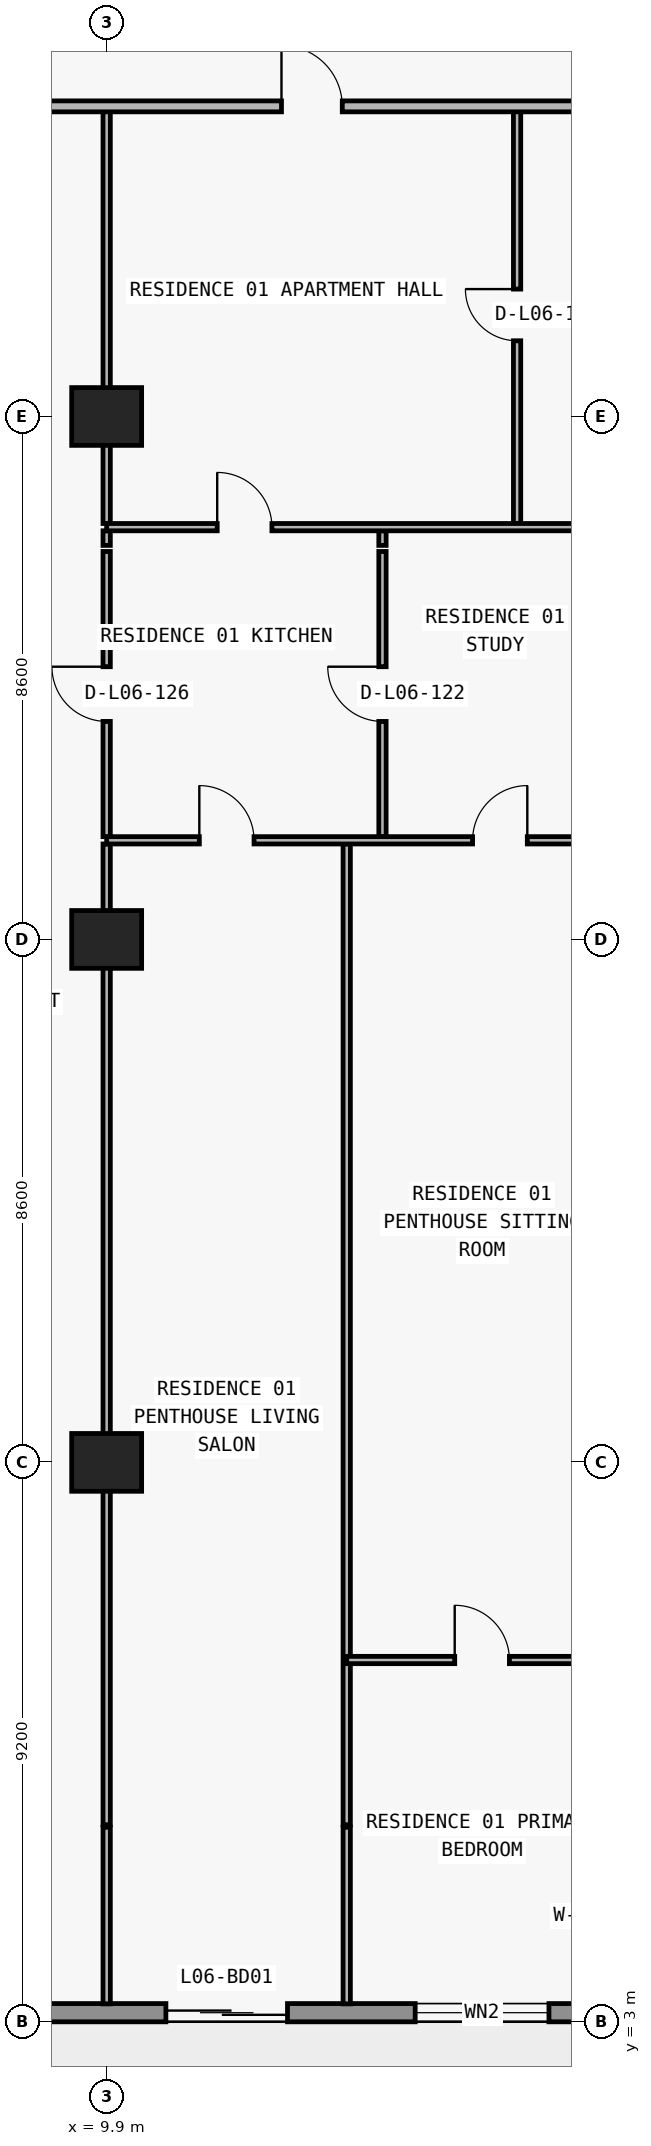
"""IFC4 building model, lengths in metres.
Left out: names, types, materials, properties, quantities, classifications, styles, units other than length and angle.
Written with IfcOpenShell. Run it as: python <this file> out.ifc"""

import sys

from ifc_helpers import new_model, si_unit, direction, frame, frame_2d, origin, origin_2d, place, context, subcontext, project, spatial, rectangle, extrude, element, fill, save


model = new_model("IFC4")
c1 = context("Model", 3, precision=1e-05, world=origin(), true_north=direction((0.0, 1.0)))
c2 = subcontext(c1, "Body", "Model", "MODEL_VIEW")
j1 = project(units=[si_unit("LENGTHUNIT", "METRE"), si_unit("PLANEANGLEUNIT", "RADIAN")], contexts=[c1])
p1 = place(None, origin())
s1 = spatial("IfcSite", under=j1, at=p1, CompositionType="ELEMENT")
p2 = place(p1, origin())
s2 = spatial("IfcBuilding", under=s1, at=p2, CompositionType="ELEMENT")
p3 = place(p2, frame((0.0, 0.0, 30.0)))
s3 = spatial("IfcBuildingStorey", under=s2, at=p3, CompositionType="ELEMENT", Elevation=30.0)
for number, where, z_axis, x_axis in (
    (1, (9.9, 12.2, 0.0), (0.0, 0.0, 1.0), (1.0, 0.0, 0.0)),
    (2, (9.9, 20.8, 0.0), (0.0, 0.0, 1.0), (1.0, 0.0, 0.0)),
    (3, (9.9, 29.4, 0.0), (0.0, 0.0, 1.0), (1.0, 0.0, 0.0)),
):
    element("IfcColumn", number, at=place(p3, frame(where, z_axis=z_axis, x_axis=x_axis)), inside=s3, PredefinedType="COLUMN", context=c2, shape_type="SweptSolid", body=[
        extrude(rectangle(XDim=1.15, YDim=0.95, at=origin_2d()), origin(), (0.0, 0.0, 1.0), 3.05),
    ])
p4 = place(p3, frame((72.7, 3.15, 0.0), z_axis=(0.0, 0.0, 1.0), x_axis=(-1.0, 0.0, 0.0)))
e4 = element("IfcWall", 4, at=p4, inside=s3, PredefinedType="STANDARD", context=c2, shape_type="SweptSolid", body=[
    extrude(rectangle(XDim=67.6, YDim=0.3, at=frame_2d((33.8, 0.0))), origin(), (0.0, 0.0, 1.0), 3.05),
])
p5 = place(p4, frame((59.826, 0.0, 0.0)))
e5 = element("IfcOpeningElement", 5, at=p5, cuts=e4, PredefinedType="OPENING", context=c2, shape_type="SweptSolid", body=[
    extrude(rectangle(XDim=2.0, YDim=2.3, at=frame_2d((1.0, 1.15))), frame((0.0, 0.16, 0.0), z_axis=(0.0, -1.0, 0.0), x_axis=(1.0, 0.0, 0.0)), (0.0, 0.0, 1.0), 0.32),
])
p6 = place(p4, frame((55.526, 0.0, 0.85)))
e6 = element("IfcOpeningElement", 6, at=p6, cuts=e4, PredefinedType="OPENING", context=c2, shape_type="SweptSolid", body=[
    extrude(rectangle(XDim=2.2, YDim=1.55, at=frame_2d((1.1, 0.775))), frame((0.0, 0.16, 0.0), z_axis=(0.0, -1.0, 0.0), x_axis=(1.0, 0.0, 0.0)), (0.0, 0.0, 1.0), 0.32),
])
p7 = place(p4, frame((51.09, 0.0, 0.0)))
e7 = element("IfcOpeningElement", 7, at=p7, cuts=e4, PredefinedType="OPENING", context=c2, shape_type="SweptSolid", body=[
    extrude(rectangle(XDim=2.0, YDim=2.3, at=frame_2d((1.0, 1.15))), frame((0.0, 0.16, 0.0), z_axis=(0.0, -1.0, 0.0), x_axis=(1.0, 0.0, 0.0)), (0.0, 0.0, 1.0), 0.32),
])
p8 = place(p4, frame((46.99, 0.0, 0.85)))
e8 = element("IfcOpeningElement", 8, at=p8, cuts=e4, PredefinedType="OPENING", context=c2, shape_type="SweptSolid", body=[
    extrude(rectangle(XDim=1.8, YDim=1.55, at=frame_2d((0.9, 0.775))), frame((0.0, 0.16, 0.0), z_axis=(0.0, -1.0, 0.0), x_axis=(1.0, 0.0, 0.0)), (0.0, 0.0, 1.0), 0.32),
])
p9 = place(p4, frame((43.026, 0.0, 0.0)))
e9 = element("IfcOpeningElement", 9, at=p9, cuts=e4, PredefinedType="OPENING", context=c2, shape_type="SweptSolid", body=[
    extrude(rectangle(XDim=2.0, YDim=2.3, at=frame_2d((1.0, 1.15))), frame((0.0, 0.16, 0.0), z_axis=(0.0, -1.0, 0.0), x_axis=(1.0, 0.0, 0.0)), (0.0, 0.0, 1.0), 0.32),
])
p10 = place(p4, frame((38.726, 0.0, 0.85)))
e10 = element("IfcOpeningElement", 10, at=p10, cuts=e4, PredefinedType="OPENING", context=c2, shape_type="SweptSolid", body=[
    extrude(rectangle(XDim=2.2, YDim=1.55, at=frame_2d((1.1, 0.775))), frame((0.0, 0.16, 0.0), z_axis=(0.0, -1.0, 0.0), x_axis=(1.0, 0.0, 0.0)), (0.0, 0.0, 1.0), 0.32),
])
p11 = place(p4, frame((34.69, 0.0, 0.0)))
e11 = element("IfcOpeningElement", 11, at=p11, cuts=e4, PredefinedType="OPENING", context=c2, shape_type="SweptSolid", body=[
    extrude(rectangle(XDim=2.0, YDim=2.3, at=frame_2d((1.0, 1.15))), frame((0.0, 0.16, 0.0), z_axis=(0.0, -1.0, 0.0), x_axis=(1.0, 0.0, 0.0)), (0.0, 0.0, 1.0), 0.32),
])
p12 = place(p4, frame((30.81, 0.0, 0.65)))
e12 = element("IfcOpeningElement", 12, at=p12, cuts=e4, PredefinedType="OPENING", context=c2, shape_type="SweptSolid", body=[
    extrude(rectangle(XDim=2.6, YDim=1.85, at=frame_2d((1.3, 0.925))), frame((0.0, 0.16, 0.0), z_axis=(0.0, -1.0, 0.0), x_axis=(1.0, 0.0, 0.0)), (0.0, 0.0, 1.0), 0.32),
])
p13 = place(p4, frame((24.7, 0.0, 0.85)))
e13 = element("IfcOpeningElement", 13, at=p13, cuts=e4, PredefinedType="OPENING", context=c2, shape_type="SweptSolid", body=[
    extrude(rectangle(XDim=2.2, YDim=1.55, at=frame_2d((1.1, 0.775))), frame((0.0, 0.16, 0.0), z_axis=(0.0, -1.0, 0.0), x_axis=(1.0, 0.0, 0.0)), (0.0, 0.0, 1.0), 0.32),
])
p14 = place(p4, frame((18.626, 0.0, 0.0)))
e14 = element("IfcOpeningElement", 14, at=p14, cuts=e4, PredefinedType="OPENING", context=c2, shape_type="SweptSolid", body=[
    extrude(rectangle(XDim=2.0, YDim=2.3, at=frame_2d((1.0, 1.15))), frame((0.0, 0.16, 0.0), z_axis=(0.0, -1.0, 0.0), x_axis=(1.0, 0.0, 0.0)), (0.0, 0.0, 1.0), 0.32),
])
p15 = place(p4, frame((14.326, 0.0, 0.85)))
e15 = element("IfcOpeningElement", 15, at=p15, cuts=e4, PredefinedType="OPENING", context=c2, shape_type="SweptSolid", body=[
    extrude(rectangle(XDim=2.2, YDim=1.55, at=frame_2d((1.1, 0.775))), frame((0.0, 0.16, 0.0), z_axis=(0.0, -1.0, 0.0), x_axis=(1.0, 0.0, 0.0)), (0.0, 0.0, 1.0), 0.32),
])
p16 = place(p4, frame((9.89, 0.0, 0.0)))
e16 = element("IfcOpeningElement", 16, at=p16, cuts=e4, PredefinedType="OPENING", context=c2, shape_type="SweptSolid", body=[
    extrude(rectangle(XDim=2.0, YDim=2.3, at=frame_2d((1.0, 1.15))), frame((0.0, 0.16, 0.0), z_axis=(0.0, -1.0, 0.0), x_axis=(1.0, 0.0, 0.0)), (0.0, 0.0, 1.0), 0.32),
])
p17 = place(p4, frame((5.79, 0.0, 0.85)))
e17 = element("IfcOpeningElement", 17, at=p17, cuts=e4, PredefinedType="OPENING", context=c2, shape_type="SweptSolid", body=[
    extrude(rectangle(XDim=1.8, YDim=1.55, at=frame_2d((0.9, 0.775))), frame((0.0, 0.16, 0.0), z_axis=(0.0, -1.0, 0.0), x_axis=(1.0, 0.0, 0.0)), (0.0, 0.0, 1.0), 0.32),
])
p18 = place(p3, frame((9.9, 3.295, 0.0), z_axis=(0.0, 0.0, 1.0), x_axis=(0.0, 1.0, 0.0)))
e18 = element("IfcWall", 18, at=p18, inside=s3, PredefinedType="PARTITIONING", context=c2, shape_type="SweptSolid", body=[
    extrude(rectangle(XDim=2.905, YDim=0.12, at=frame_2d((1.453, 0.0))), origin(), (0.0, 0.0, 1.0), 3.05),
])
p19 = place(p3, frame((9.9, 6.24, 0.0), z_axis=(0.0, 0.0, 1.0), x_axis=(0.0, 1.0, 0.0)))
e19 = element("IfcWall", 19, at=p19, inside=s3, PredefinedType="PARTITIONING", context=c2, shape_type="SweptSolid", body=[
    extrude(rectangle(XDim=16.13, YDim=0.12, at=frame_2d((8.065, 0.0))), origin(), (0.0, 0.0, 1.0), 2.11),
])
p20 = place(p3, frame((9.9, 22.49, 0.0), z_axis=(0.0, 0.0, 1.0), x_axis=(0.0, 1.0, 0.0)))
e20 = element("IfcWall", 20, at=p20, inside=s3, PredefinedType="PARTITIONING", context=c2, shape_type="SweptSolid", body=[
    extrude(rectangle(XDim=4.69, YDim=0.12, at=frame_2d((2.345, 0.0))), origin(), (0.0, 0.0, 1.0), 2.11),
])
p21 = place(p20, frame((1.895, 0.0, 0.0)))
e21 = element("IfcOpeningElement", 21, at=p21, cuts=e20, PredefinedType="OPENING", context=c2, shape_type="SweptSolid", body=[
    extrude(rectangle(XDim=0.9, YDim=2.06, at=frame_2d((0.45, 1.03))), frame((0.0, 0.07, 0.0), z_axis=(0.0, -1.0, 0.0), x_axis=(1.0, 0.0, 0.0)), (0.0, 0.0, 1.0), 0.14),
])
p22 = place(p3, frame((9.9, 27.28, 0.0), z_axis=(0.0, 0.0, 1.0), x_axis=(0.0, 1.0, 0.0)))
e22 = element("IfcWall", 22, at=p22, inside=s3, PredefinedType="PARTITIONING", context=c2, shape_type="SweptSolid", body=[
    extrude(rectangle(XDim=0.24, YDim=0.12, at=frame_2d((0.12, 0.0))), origin(), (0.0, 0.0, 1.0), 2.11),
])
p23 = place(p3, frame((9.9, 27.64, 0.0), z_axis=(0.0, 0.0, 1.0), x_axis=(0.0, 1.0, 0.0)))
e23 = element("IfcWall", 23, at=p23, inside=s3, PredefinedType="PARTITIONING", context=c2, shape_type="SweptSolid", body=[
    extrude(rectangle(XDim=6.86, YDim=0.12, at=frame_2d((3.43, 0.0))), origin(), (0.0, 0.0, 1.0), 2.11),
])
p24 = place(p3, frame((13.848, 3.295, 0.0), z_axis=(0.0, 0.0, 1.0), x_axis=(0.0, 1.0, 0.0)))
e24 = element("IfcWall", 24, at=p24, inside=s3, PredefinedType="PARTITIONING", context=c2, shape_type="SweptSolid", body=[
    extrude(rectangle(XDim=2.905, YDim=0.12, at=frame_2d((1.453, 0.0))), origin(), (0.0, 0.0, 1.0), 3.05),
])
p25 = place(p3, frame((13.848, 6.24, 0.0), z_axis=(0.0, 0.0, 1.0), x_axis=(0.0, 1.0, 0.0)))
e25 = element("IfcWall", 25, at=p25, inside=s3, PredefinedType="PARTITIONING", context=c2, shape_type="SweptSolid", body=[
    extrude(rectangle(XDim=16.13, YDim=0.12, at=frame_2d((8.065, 0.0))), origin(), (0.0, 0.0, 1.0), 3.05),
])
p26 = place(p3, frame((14.436, 22.49, 0.0), z_axis=(0.0, 0.0, 1.0), x_axis=(0.0, 1.0, 0.0)))
e26 = element("IfcWall", 26, at=p26, inside=s3, PredefinedType="PARTITIONING", context=c2, shape_type="SweptSolid", body=[
    extrude(rectangle(XDim=4.69, YDim=0.12, at=frame_2d((2.345, 0.0))), origin(), (0.0, 0.0, 1.0), 3.05),
])
p27 = place(p26, frame((1.895, 0.0, 0.0)))
e27 = element("IfcOpeningElement", 27, at=p27, cuts=e26, PredefinedType="OPENING", context=c2, shape_type="SweptSolid", body=[
    extrude(rectangle(XDim=0.9, YDim=2.15, at=frame_2d((0.45, 1.075))), frame((0.0, 0.07, 0.0), z_axis=(0.0, -1.0, 0.0), x_axis=(1.0, 0.0, 0.0)), (0.0, 0.0, 1.0), 0.14),
])
p28 = place(p3, frame((14.436, 27.28, 0.0), z_axis=(0.0, 0.0, 1.0), x_axis=(0.0, 1.0, 0.0)))
e28 = element("IfcWall", 28, at=p28, inside=s3, PredefinedType="PARTITIONING", context=c2, shape_type="SweptSolid", body=[
    extrude(rectangle(XDim=0.24, YDim=0.12, at=frame_2d((0.12, 0.0))), origin(), (0.0, 0.0, 1.0), 3.05),
])
p29 = place(p3, frame((16.65, 27.64, 0.0), z_axis=(0.0, 0.0, 1.0), x_axis=(0.0, 1.0, 0.0)))
e29 = element("IfcWall", 29, at=p29, inside=s3, PredefinedType="PARTITIONING", context=c2, shape_type="SweptSolid", body=[
    extrude(rectangle(XDim=6.86, YDim=0.12, at=frame_2d((3.43, 0.0))), origin(), (0.0, 0.0, 1.0), 3.05),
])
p30 = place(p29, frame((3.005, 0.0, 0.0)))
e30 = element("IfcOpeningElement", 30, at=p30, cuts=e29, PredefinedType="OPENING", context=c2, shape_type="SweptSolid", body=[
    extrude(rectangle(XDim=0.85, YDim=2.1, at=frame_2d((0.425, 1.05))), frame((0.0, 0.07, 0.0), z_axis=(0.0, -1.0, 0.0), x_axis=(1.0, 0.0, 0.0)), (0.0, 0.0, 1.0), 0.14),
])
p31 = place(p3, frame((13.848, 8.95, 0.0), z_axis=(0.0, 0.0, 1.0), x_axis=(1.0, 0.0, 0.0)))
e31 = element("IfcWall", 31, at=p31, inside=s3, PredefinedType="PARTITIONING", context=c2, shape_type="SweptSolid", body=[
    extrude(rectangle(XDim=4.452, YDim=0.12, at=frame_2d((2.226, 0.0))), origin(), (0.0, 0.0, 1.0), 3.05),
])
p32 = place(p31, frame((1.776, 0.0, 0.0)))
e32 = element("IfcOpeningElement", 32, at=p32, cuts=e31, PredefinedType="OPENING", context=c2, shape_type="SweptSolid", body=[
    extrude(rectangle(XDim=0.9, YDim=2.15, at=frame_2d((0.45, 1.075))), frame((0.0, 0.07, 0.0), z_axis=(0.0, -1.0, 0.0), x_axis=(1.0, 0.0, 0.0)), (0.0, 0.0, 1.0), 0.14),
])
p33 = place(p3, frame((9.9, 22.43, 0.0), z_axis=(0.0, 0.0, 1.0), x_axis=(1.0, 0.0, 0.0)))
e33 = element("IfcWall", 33, at=p33, inside=s3, PredefinedType="PARTITIONING", context=c2, shape_type="SweptSolid", body=[
    extrude(rectangle(XDim=8.4, YDim=0.12, at=frame_2d((4.2, 0.0))), origin(), (0.0, 0.0, 1.0), 3.05),
])
p34 = place(p33, frame((1.524, 0.0, 0.0)))
e34 = element("IfcOpeningElement", 34, at=p34, cuts=e33, PredefinedType="OPENING", context=c2, shape_type="SweptSolid", body=[
    extrude(rectangle(XDim=0.9, YDim=2.15, at=frame_2d((0.45, 1.075))), frame((0.0, 0.07, 0.0), z_axis=(0.0, -1.0, 0.0), x_axis=(1.0, 0.0, 0.0)), (0.0, 0.0, 1.0), 0.14),
])
p35 = place(p33, frame((6.018, 0.0, 0.0)))
e35 = element("IfcOpeningElement", 35, at=p35, cuts=e33, PredefinedType="OPENING", context=c2, shape_type="SweptSolid", body=[
    extrude(rectangle(XDim=0.9, YDim=2.15, at=frame_2d((0.45, 1.075))), frame((0.0, 0.07, 0.0), z_axis=(0.0, -1.0, 0.0), x_axis=(1.0, 0.0, 0.0)), (0.0, 0.0, 1.0), 0.14),
])
p36 = place(p3, frame((9.9, 27.58, 0.0), z_axis=(0.0, 0.0, 1.0), x_axis=(1.0, 0.0, 0.0)))
e36 = element("IfcWall", 36, at=p36, inside=s3, PredefinedType="PARTITIONING", context=c2, shape_type="SweptSolid", body=[
    extrude(rectangle(XDim=8.4, YDim=0.12, at=frame_2d((4.2, 0.0))), origin(), (0.0, 0.0, 1.0), 3.05),
])
p37 = place(p36, frame((1.818, 0.0, 0.0)))
e37 = element("IfcOpeningElement", 37, at=p37, cuts=e36, PredefinedType="OPENING", context=c2, shape_type="SweptSolid", body=[
    extrude(rectangle(XDim=0.9, YDim=2.15, at=frame_2d((0.45, 1.075))), frame((0.0, 0.07, 0.0), z_axis=(0.0, -1.0, 0.0), x_axis=(1.0, 0.0, 0.0)), (0.0, 0.0, 1.0), 0.14),
])
p38 = place(p3, frame((5.105, 34.5, 0.0), z_axis=(0.0, 0.0, 1.0), x_axis=(1.0, 0.0, 0.0)))
e38 = element("IfcWall", 38, at=p38, inside=s3, PredefinedType="PARTITIONING", context=c2, shape_type="SweptSolid", body=[
    extrude(rectangle(XDim=50.781, YDim=0.18, at=frame_2d((25.391, 0.0))), origin(), (0.0, 0.0, 1.0), 3.05),
])
p39 = place(p38, frame((7.67, 0.0, 0.0)))
e39 = element("IfcOpeningElement", 39, at=p39, cuts=e38, PredefinedType="OPENING", context=c2, shape_type="SweptSolid", body=[
    extrude(rectangle(XDim=1.0, YDim=2.2, at=frame_2d((0.5, 1.1))), frame((0.0, 0.1, 0.0), z_axis=(0.0, -1.0, 0.0), x_axis=(1.0, 0.0, 0.0)), (0.0, 0.0, 1.0), 0.2),
])
p40 = place(p38, frame((16.07, 0.0, 0.0)))
e40 = element("IfcOpeningElement", 40, at=p40, cuts=e38, PredefinedType="OPENING", context=c2, shape_type="SweptSolid", body=[
    extrude(rectangle(XDim=1.0, YDim=2.2, at=frame_2d((0.5, 1.1))), frame((0.0, 0.1, 0.0), z_axis=(0.0, -1.0, 0.0), x_axis=(1.0, 0.0, 0.0)), (0.0, 0.0, 1.0), 0.2),
])
p41 = place(p38, frame((24.47, 0.0, 0.0)))
e41 = element("IfcOpeningElement", 41, at=p41, cuts=e38, PredefinedType="OPENING", context=c2, shape_type="SweptSolid", body=[
    extrude(rectangle(XDim=1.0, YDim=2.2, at=frame_2d((0.5, 1.1))), frame((0.0, 0.1, 0.0), z_axis=(0.0, -1.0, 0.0), x_axis=(1.0, 0.0, 0.0)), (0.0, 0.0, 1.0), 0.2),
])
p42 = place(p38, frame((32.545, 0.0, 0.0)))
e42 = element("IfcOpeningElement", 42, at=p42, cuts=e38, PredefinedType="OPENING", context=c2, shape_type="SweptSolid", body=[
    extrude(rectangle(XDim=1.0, YDim=2.2, at=frame_2d((0.5, 1.1))), frame((0.0, 0.1, 0.0), z_axis=(0.0, -1.0, 0.0), x_axis=(1.0, 0.0, 0.0)), (0.0, 0.0, 1.0), 0.2),
])
p43 = place(p38, frame((47.888, 0.0, 0.0)))
e43 = element("IfcOpeningElement", 43, at=p43, cuts=e38, PredefinedType="OPENING", context=c2, shape_type="SweptSolid", body=[
    extrude(rectangle(XDim=1.0, YDim=2.2, at=frame_2d((0.5, 1.1))), frame((0.0, 0.1, 0.0), z_axis=(0.0, -1.0, 0.0), x_axis=(1.0, 0.0, 0.0)), (0.0, 0.0, 1.0), 0.2),
])
p44 = place(p5, origin())
e44 = element("IfcDoor", 44, at=p44, inside=s3, OperationType="DOUBLE_DOOR_SLIDING", PredefinedType="DOOR", context=c2, shape_type="SweptSolid", body=[
    extrude(rectangle(XDim=2.0, YDim=2.3, at=frame_2d((1.0, 1.15))), frame((0.0, 0.025, 0.0), z_axis=(0.0, -1.0, 0.0), x_axis=(1.0, 0.0, 0.0)), (0.0, 0.0, 1.0), 0.05),
])
fill(e5, e44)
p45 = place(p6, origin())
e45 = element("IfcWindow", 45, at=p45, inside=s3, PartitioningType="SINGLE_PANEL", PredefinedType="WINDOW", context=c2, shape_type="SweptSolid", body=[
    extrude(rectangle(XDim=2.2, YDim=1.55, at=frame_2d((1.1, 0.775))), frame((0.0, 0.03, 0.0), z_axis=(0.0, -1.0, 0.0), x_axis=(1.0, 0.0, 0.0)), (0.0, 0.0, 1.0), 0.06),
])
fill(e6, e45)
p46 = place(p39, origin())
e46 = element("IfcDoor", 46, at=p46, inside=s3, OperationType="SINGLE_SWING_LEFT", PredefinedType="DOOR", context=c2, shape_type="SweptSolid", body=[
    extrude(rectangle(XDim=1.0, YDim=2.2, at=frame_2d((0.5, 1.1))), frame((0.0, 0.025, 0.0), z_axis=(0.0, -1.0, 0.0), x_axis=(1.0, 0.0, 0.0)), (0.0, 0.0, 1.0), 0.05),
])
fill(e39, e46)
p47 = place(p30, origin())
e47 = element("IfcDoor", 47, at=p47, inside=s3, OperationType="SINGLE_SWING_RIGHT", PredefinedType="DOOR", context=c2, shape_type="SweptSolid", body=[
    extrude(rectangle(XDim=0.85, YDim=2.1, at=frame_2d((0.425, 1.05))), frame((0.0, 0.025, 0.0), z_axis=(0.0, -1.0, 0.0), x_axis=(1.0, 0.0, 0.0)), (0.0, 0.0, 1.0), 0.05),
])
fill(e30, e47)
p48 = place(p37, origin())
e48 = element("IfcDoor", 48, at=p48, inside=s3, OperationType="SINGLE_SWING_LEFT", PredefinedType="DOOR", context=c2, shape_type="SweptSolid", body=[
    extrude(rectangle(XDim=0.9, YDim=2.15, at=frame_2d((0.45, 1.075))), frame((0.0, 0.025, 0.0), z_axis=(0.0, -1.0, 0.0), x_axis=(1.0, 0.0, 0.0)), (0.0, 0.0, 1.0), 0.05),
])
fill(e37, e48)
p49 = place(p27, origin())
e49 = element("IfcDoor", 49, at=p49, inside=s3, OperationType="SINGLE_SWING_RIGHT", PredefinedType="DOOR", context=c2, shape_type="SweptSolid", body=[
    extrude(rectangle(XDim=0.9, YDim=2.15, at=frame_2d((0.45, 1.075))), frame((0.0, 0.025, 0.0), z_axis=(0.0, -1.0, 0.0), x_axis=(1.0, 0.0, 0.0)), (0.0, 0.0, 1.0), 0.05),
])
fill(e27, e49)
p50 = place(p34, origin())
e50 = element("IfcDoor", 50, at=p50, inside=s3, OperationType="SINGLE_SWING_LEFT", PredefinedType="DOOR", context=c2, shape_type="SweptSolid", body=[
    extrude(rectangle(XDim=0.9, YDim=2.15, at=frame_2d((0.45, 1.075))), frame((0.0, 0.025, 0.0), z_axis=(0.0, -1.0, 0.0), x_axis=(1.0, 0.0, 0.0)), (0.0, 0.0, 1.0), 0.05),
])
fill(e34, e50)
p51 = place(p35, origin())
e51 = element("IfcDoor", 51, at=p51, inside=s3, OperationType="SINGLE_SWING_RIGHT", PredefinedType="DOOR", context=c2, shape_type="SweptSolid", body=[
    extrude(rectangle(XDim=0.9, YDim=2.15, at=frame_2d((0.45, 1.075))), frame((0.0, 0.025, 0.0), z_axis=(0.0, -1.0, 0.0), x_axis=(1.0, 0.0, 0.0)), (0.0, 0.0, 1.0), 0.05),
])
fill(e35, e51)
p52 = place(p32, origin())
e52 = element("IfcDoor", 52, at=p52, inside=s3, OperationType="SINGLE_SWING_LEFT", PredefinedType="DOOR", context=c2, shape_type="SweptSolid", body=[
    extrude(rectangle(XDim=0.9, YDim=2.15, at=frame_2d((0.45, 1.075))), frame((0.0, 0.025, 0.0), z_axis=(0.0, -1.0, 0.0), x_axis=(1.0, 0.0, 0.0)), (0.0, 0.0, 1.0), 0.05),
])
fill(e32, e52)
p53 = place(p21, origin())
e53 = element("IfcDoor", 53, at=p53, inside=s3, OperationType="SINGLE_SWING_RIGHT", PredefinedType="DOOR", context=c2, shape_type="SweptSolid", body=[
    extrude(rectangle(XDim=0.9, YDim=2.06, at=frame_2d((0.45, 1.03))), frame((0.0, 0.025, 0.0), z_axis=(0.0, -1.0, 0.0), x_axis=(1.0, 0.0, 0.0)), (0.0, 0.0, 1.0), 0.05),
])
fill(e21, e53)
save(model, sys.argv[1])
